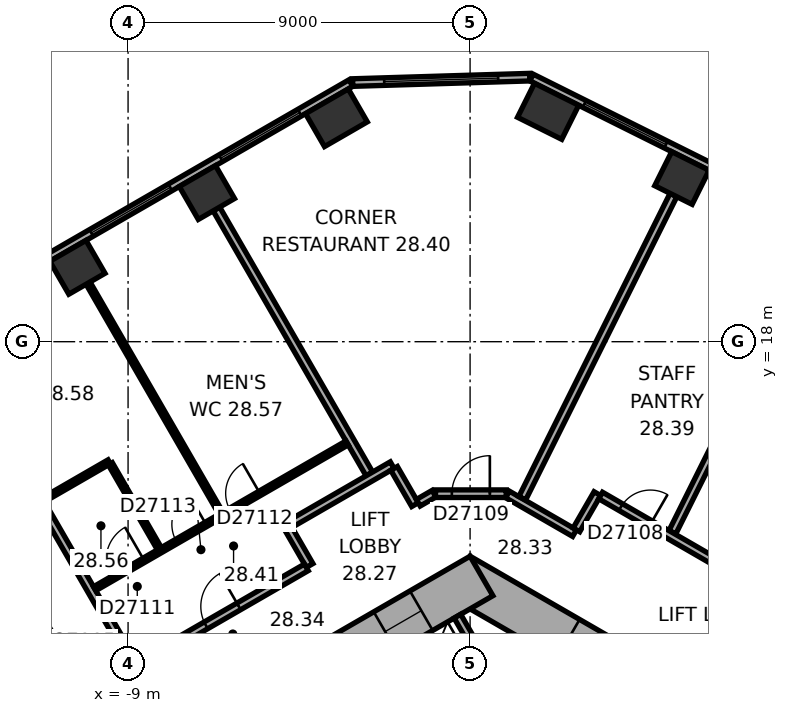
"""IFC4 building model, lengths in metres.
Left out: names, types, materials, properties, quantities, classifications, styles, units other than length and angle.
Written with IfcOpenShell. Run it as: python <this file> out.ifc"""

import sys

from ifc_helpers import new_model, si_unit, direction, frame, frame_2d, origin, origin_2d, place, context, subcontext, project, spatial, rectangle, extrude, element, fill, save


model = new_model("IFC4")
c1 = context("Model", 3, precision=1e-05, world=origin(), true_north=direction((0.0, 1.0)))
c2 = subcontext(c1, "Body", "Model", "MODEL_VIEW")
j1 = project(units=[si_unit("LENGTHUNIT", "METRE"), si_unit("PLANEANGLEUNIT", "RADIAN")], contexts=[c1])
p1 = place(None, origin())
s1 = spatial("IfcSite", under=j1, at=p1, CompositionType="ELEMENT")
p2 = place(p1, origin())
s2 = spatial("IfcBuilding", under=s1, at=p2, CompositionType="ELEMENT")
p3 = place(p2, frame((0.0, 0.0, 116.6)))
s3 = spatial("IfcBuildingStorey", under=s2, at=p3, CompositionType="ELEMENT", Elevation=116.6)
p4 = place(p3, frame((5.574, 22.306, 0.0), z_axis=(0.0, 0.0, 1.0), x_axis=(-0.894934361602, 0.44619781311, 0.0)))
e1 = element("IfcColumn", 1, at=p4, inside=s3, PredefinedType="COLUMN", context=c2, shape_type="SweptSolid", body=[
    extrude(rectangle(XDim=1.1, YDim=1.0, at=origin_2d()), origin(), (0.0, 0.0, 1.0), 3.3),
])
for number, where, z_axis, x_axis in (
    (2, (2.053, 24.062, 0.0), (0.0, 0.0, 1.0), (-0.895, 0.446, 0.0)),
    (3, (-3.518, 23.892, 0.0), (0.0, 0.0, 1.0), (-0.866, -0.5, 0.0)),
):
    element("IfcColumn", number, at=place(p3, frame(where, z_axis=z_axis, x_axis=x_axis)), inside=s3, PredefinedType="COLUMN", context=c2, shape_type="SweptSolid", body=[
        extrude(rectangle(XDim=1.3, YDim=1.0, at=origin_2d()), origin(), (0.0, 0.0, 1.0), 3.3),
    ])
for number, where, z_axis, x_axis in (
    (4, (-6.926, 21.925, 0.0), (0.0, 0.0, 1.0), (-0.866, -0.5, 0.0)),
    (5, (-10.333, 19.957, 0.0), (0.0, 0.0, 1.0), (-0.866, -0.5, 0.0)),
):
    element("IfcColumn", number, at=place(p3, frame(where, z_axis=z_axis, x_axis=x_axis)), inside=s3, PredefinedType="COLUMN", context=c2, shape_type="SweptSolid", body=[
        extrude(rectangle(XDim=1.1, YDim=1.0, at=origin_2d()), origin(), (0.0, 0.0, 1.0), 3.3),
    ])
p5 = place(p3, frame((10.4, 5.658, 0.0), z_axis=(0.0, 0.0, 1.0), x_axis=(-0.866021384402, 0.500006961711, 0.0)))
e6 = element("IfcWall", 6, at=p5, inside=s3, PredefinedType="SHEAR", context=c2, shape_type="SweptSolid", body=[
    extrude(rectangle(XDim=12.355, YDim=1.2, at=frame_2d((6.178, 0.0))), origin(), (0.0, 0.0, 1.0), 3.3),
])
p6 = place(p5, frame((2.728, 0.0, 0.0)))
e7 = element("IfcOpeningElement", 7, at=p6, cuts=e6, PredefinedType="OPENING", context=c2, shape_type="SweptSolid", body=[
    extrude(rectangle(XDim=1.1, YDim=2.1, at=frame_2d((0.55, 1.05))), frame((0.0, 0.61, 0.0), z_axis=(0.0, -1.0, 0.0), x_axis=(1.0, 0.0, 0.0)), (0.0, 0.0, 1.0), 1.22),
])
p7 = place(p5, frame((5.328, 0.0, 0.0)))
e8 = element("IfcOpeningElement", 8, at=p7, cuts=e6, PredefinedType="OPENING", context=c2, shape_type="SweptSolid", body=[
    extrude(rectangle(XDim=1.1, YDim=2.1, at=frame_2d((0.55, 1.05))), frame((0.0, 0.61, 0.0), z_axis=(0.0, -1.0, 0.0), x_axis=(1.0, 0.0, 0.0)), (0.0, 0.0, 1.0), 1.22),
])
p8 = place(p5, frame((7.928, 0.0, 0.0)))
e9 = element("IfcOpeningElement", 9, at=p8, cuts=e6, PredefinedType="OPENING", context=c2, shape_type="SweptSolid", body=[
    extrude(rectangle(XDim=1.1, YDim=2.1, at=frame_2d((0.55, 1.05))), frame((0.0, 0.61, 0.0), z_axis=(0.0, -1.0, 0.0), x_axis=(1.0, 0.0, 0.0)), (0.0, 0.0, 1.0), 1.22),
])
p9 = place(p3, frame((0.3, 11.836, 0.0), z_axis=(0.0, 0.0, 1.0), x_axis=(-0.866021384402, -0.500006961711, 0.0)))
e10 = element("IfcWall", 10, at=p9, inside=s3, PredefinedType="SHEAR", context=c2, shape_type="SweptSolid", body=[
    extrude(rectangle(XDim=12.355, YDim=1.2, at=frame_2d((6.178, 0.0))), origin(), (0.0, 0.0, 1.0), 3.3),
])
p10 = place(p9, frame((6.378, 0.0, 0.0)))
e11 = element("IfcOpeningElement", 11, at=p10, cuts=e10, PredefinedType="OPENING", context=c2, shape_type="SweptSolid", body=[
    extrude(rectangle(XDim=1.5, YDim=2.1, at=frame_2d((0.75, 1.05))), frame((0.0, 0.61, 0.0), z_axis=(0.0, -1.0, 0.0), x_axis=(1.0, 0.0, 0.0)), (0.0, 0.0, 1.0), 1.22),
])
p11 = place(p9, frame((1.828, 0.0, 0.0)))
e12 = element("IfcOpeningElement", 12, at=p11, cuts=e10, PredefinedType="OPENING", context=c2, shape_type="SweptSolid", body=[
    extrude(rectangle(XDim=1.1, YDim=2.1, at=frame_2d((0.55, 1.05))), frame((0.0, 0.61, 0.0), z_axis=(0.0, -1.0, 0.0), x_axis=(1.0, 0.0, 0.0)), (0.0, 0.0, 1.0), 1.22),
])
p12 = place(p3, frame((20.63, 15.47, 0.0), z_axis=(0.0, 0.0, 1.0), x_axis=(-0.894934518609, 0.446197498203, 0.0)))
e13 = element("IfcWall", 13, at=p12, inside=s3, PredefinedType="STANDARD", context=c2, shape_type="SweptSolid", body=[
    extrude(rectangle(XDim=21.246, YDim=0.2, at=frame_2d((10.623, 0.0))), origin(), (0.0, 0.0, 1.0), 3.3),
])
p13 = place(p12, frame((1.553, 0.0, 0.8)))
e14 = element("IfcOpeningElement", 14, at=p13, cuts=e13, PredefinedType="OPENING", context=c2, shape_type="SweptSolid", body=[
    extrude(rectangle(XDim=2.4, YDim=1.7, at=frame_2d((1.2, 0.85))), frame((0.0, 0.11, 0.0), z_axis=(0.0, -1.0, 0.0), x_axis=(1.0, 0.0, 0.0)), (0.0, 0.0, 1.0), 0.22),
])
p14 = place(p12, frame((5.488, 0.0, 0.8)))
e15 = element("IfcOpeningElement", 15, at=p14, cuts=e13, PredefinedType="OPENING", context=c2, shape_type="SweptSolid", body=[
    extrude(rectangle(XDim=2.4, YDim=1.7, at=frame_2d((1.2, 0.85))), frame((0.0, 0.11, 0.0), z_axis=(0.0, -1.0, 0.0), x_axis=(1.0, 0.0, 0.0)), (0.0, 0.0, 1.0), 0.22),
])
p15 = place(p12, frame((9.422, 0.0, 0.8)))
e16 = element("IfcOpeningElement", 16, at=p15, cuts=e13, PredefinedType="OPENING", context=c2, shape_type="SweptSolid", body=[
    extrude(rectangle(XDim=2.4, YDim=1.7, at=frame_2d((1.2, 0.85))), frame((0.0, 0.11, 0.0), z_axis=(0.0, -1.0, 0.0), x_axis=(1.0, 0.0, 0.0)), (0.0, 0.0, 1.0), 0.22),
])
p16 = place(p12, frame((13.357, 0.0, 0.8)))
e17 = element("IfcOpeningElement", 17, at=p16, cuts=e13, PredefinedType="OPENING", context=c2, shape_type="SweptSolid", body=[
    extrude(rectangle(XDim=2.4, YDim=1.7, at=frame_2d((1.2, 0.85))), frame((0.0, 0.11, 0.0), z_axis=(0.0, -1.0, 0.0), x_axis=(1.0, 0.0, 0.0)), (0.0, 0.0, 1.0), 0.22),
])
p17 = place(p12, frame((17.292, 0.0, 0.8)))
e18 = element("IfcOpeningElement", 18, at=p17, cuts=e13, PredefinedType="OPENING", context=c2, shape_type="SweptSolid", body=[
    extrude(rectangle(XDim=2.4, YDim=1.7, at=frame_2d((1.2, 0.85))), frame((0.0, 0.11, 0.0), z_axis=(0.0, -1.0, 0.0), x_axis=(1.0, 0.0, 0.0)), (0.0, 0.0, 1.0), 0.22),
])
p18 = place(p3, frame((1.568, 24.961, 0.0), z_axis=(0.0, 0.0, 1.0), x_axis=(-0.999533359013, -0.030546099927, 0.0)))
e19 = element("IfcWall", 19, at=p18, inside=s3, PredefinedType="STANDARD", context=c2, shape_type="SweptSolid", body=[
    extrude(rectangle(XDim=4.66, YDim=0.2, at=frame_2d((2.33, 0.0))), origin(), (0.0, 0.0, 1.0), 3.3),
])
p19 = place(p18, frame((0.83, 0.0, 0.8)))
e20 = element("IfcOpeningElement", 20, at=p19, cuts=e19, PredefinedType="OPENING", context=c2, shape_type="SweptSolid", body=[
    extrude(rectangle(XDim=3.0, YDim=1.7, at=frame_2d((1.5, 0.85))), frame((0.0, 0.11, 0.0), z_axis=(0.0, -1.0, 0.0), x_axis=(1.0, 0.0, 0.0)), (0.0, 0.0, 1.0), 0.22),
])
p20 = place(p3, frame((-3.136, 24.805, 0.0), z_axis=(0.0, 0.0, 1.0), x_axis=(-0.866028291626, -0.499994998079, 0.0)))
e21 = element("IfcWall", 21, at=p20, inside=s3, PredefinedType="STANDARD", context=c2, shape_type="SweptSolid", body=[
    extrude(rectangle(XDim=21.246, YDim=0.2, at=frame_2d((10.623, 0.0))), origin(), (0.0, 0.0, 1.0), 3.3),
])
p21 = place(p20, frame((1.555, 0.0, 0.8)))
e22 = element("IfcOpeningElement", 22, at=p21, cuts=e21, PredefinedType="OPENING", context=c2, shape_type="SweptSolid", body=[
    extrude(rectangle(XDim=2.4, YDim=1.7, at=frame_2d((1.2, 0.85))), frame((0.0, 0.11, 0.0), z_axis=(0.0, -1.0, 0.0), x_axis=(1.0, 0.0, 0.0)), (0.0, 0.0, 1.0), 0.22),
])
p22 = place(p20, frame((5.489, 0.0, 0.8)))
e23 = element("IfcOpeningElement", 23, at=p22, cuts=e21, PredefinedType="OPENING", context=c2, shape_type="SweptSolid", body=[
    extrude(rectangle(XDim=2.4, YDim=1.7, at=frame_2d((1.2, 0.85))), frame((0.0, 0.11, 0.0), z_axis=(0.0, -1.0, 0.0), x_axis=(1.0, 0.0, 0.0)), (0.0, 0.0, 1.0), 0.22),
])
p23 = place(p20, frame((9.424, 0.0, 0.8)))
e24 = element("IfcOpeningElement", 24, at=p23, cuts=e21, PredefinedType="OPENING", context=c2, shape_type="SweptSolid", body=[
    extrude(rectangle(XDim=2.4, YDim=1.7, at=frame_2d((1.2, 0.85))), frame((0.0, 0.11, 0.0), z_axis=(0.0, -1.0, 0.0), x_axis=(1.0, 0.0, 0.0)), (0.0, 0.0, 1.0), 0.22),
])
p24 = place(p20, frame((13.358, 0.0, 0.8)))
e25 = element("IfcOpeningElement", 25, at=p24, cuts=e21, PredefinedType="OPENING", context=c2, shape_type="SweptSolid", body=[
    extrude(rectangle(XDim=2.4, YDim=1.7, at=frame_2d((1.2, 0.85))), frame((0.0, 0.11, 0.0), z_axis=(0.0, -1.0, 0.0), x_axis=(1.0, 0.0, 0.0)), (0.0, 0.0, 1.0), 0.22),
])
p25 = place(p20, frame((17.293, 0.0, 0.8)))
e26 = element("IfcOpeningElement", 26, at=p25, cuts=e21, PredefinedType="OPENING", context=c2, shape_type="SweptSolid", body=[
    extrude(rectangle(XDim=2.4, YDim=1.7, at=frame_2d((1.2, 0.85))), frame((0.0, 0.11, 0.0), z_axis=(0.0, -1.0, 0.0), x_axis=(1.0, 0.0, 0.0)), (0.0, 0.0, 1.0), 0.22),
])
p26 = place(p3, frame((0.767, 8.872, 0.0), z_axis=(0.0, 0.0, 1.0), x_axis=(-0.499994660107, 0.866028486751, 0.0)))
e27 = element("IfcWall", 27, at=p26, inside=s3, PredefinedType="PARTITIONING", context=c2, shape_type="SweptSolid", body=[
    extrude(rectangle(XDim=2.2, YDim=0.2, at=frame_2d((1.1, 0.0))), origin(), (0.0, 0.0, 1.0), 2.95),
])
p27 = place(p3, frame((-11.385, 10.909, 0.0), z_axis=(0.0, 0.0, 1.0), x_axis=(0.500077547548, -0.865980627057, 0.0)))
e28 = element("IfcWall", 28, at=p27, inside=s3, PredefinedType="PARTITIONING", context=c2, shape_type="SweptSolid", body=[
    extrude(rectangle(XDim=2.44, YDim=0.12, at=frame_2d((1.22, 0.0))), origin(), (0.0, 0.0, 1.0), 2.95),
])
p28 = place(p27, frame((0.77, 0.0, 0.0)))
e29 = element("IfcOpeningElement", 29, at=p28, cuts=e28, PredefinedType="OPENING", context=c2, shape_type="SweptSolid", body=[
    extrude(rectangle(XDim=0.9, YDim=2.1, at=frame_2d((0.45, 1.05))), frame((0.0, 0.07, 0.0), z_axis=(0.0, -1.0, 0.0), x_axis=(1.0, 0.0, 0.0)), (0.0, 0.0, 1.0), 0.14),
])
p29 = place(p3, frame((-10.053, 19.542, 0.0), z_axis=(0.0, 0.0, 1.0), x_axis=(0.49998952364, -0.866031452229, 0.0)))
e30 = element("IfcWall", 30, at=p29, inside=s3, PredefinedType="PARTITIONING", context=c2, shape_type="SweptSolid", body=[
    extrude(rectangle(XDim=6.99, YDim=0.12, at=frame_2d((3.495, 0.0))), origin(), (0.0, 0.0, 1.0), 2.15),
])
p30 = place(p3, frame((-9.497, 14.84, 0.0), z_axis=(0.0, 0.0, 1.0), x_axis=(-0.866041268327, -0.499972520799, 0.0)))
e31 = element("IfcWall", 31, at=p30, inside=s3, PredefinedType="PARTITIONING", context=c2, shape_type="SweptSolid", body=[
    extrude(rectangle(XDim=2.0, YDim=0.12, at=frame_2d((1.0, 0.0))), origin(), (0.0, 0.0, 1.0), 2.95),
])
p31 = place(p3, frame((-8.177, 12.553, 0.0), z_axis=(0.0, 0.0, 1.0), x_axis=(-0.500006411147, 0.866021702275, 0.0)))
e32 = element("IfcWall", 32, at=p31, inside=s3, PredefinedType="PARTITIONING", context=c2, shape_type="SweptSolid", body=[
    extrude(rectangle(XDim=2.58, YDim=0.12, at=frame_2d((1.29, 0.0))), origin(), (0.0, 0.0, 1.0), 2.95),
])
p32 = place(p3, frame((-7.865, 7.814, 0.0), z_axis=(0.0, 0.0, 1.0), x_axis=(-0.500004234368, 0.866022959057, 0.0)))
e33 = element("IfcWall", 33, at=p32, inside=s3, PredefinedType="PARTITIONING", context=c2, shape_type="SweptSolid", body=[
    extrude(rectangle(XDim=11.25, YDim=0.2, at=frame_2d((5.625, 0.0))), origin(), (0.0, 0.0, 1.0), 2.95),
])
p33 = place(p32, frame((0.5, 0.0, 0.0)))
e34 = element("IfcOpeningElement", 34, at=p33, cuts=e33, PredefinedType="OPENING", context=c2, shape_type="SweptSolid", body=[
    extrude(rectangle(XDim=0.9, YDim=2.1, at=frame_2d((0.45, 1.05))), frame((0.0, 0.11, 0.0), z_axis=(0.0, -1.0, 0.0), x_axis=(1.0, 0.0, 0.0)), (0.0, 0.0, 1.0), 0.22),
])
p34 = place(p3, frame((-6.676, 21.492, 0.0), z_axis=(0.0, 0.0, 1.0), x_axis=(0.500011263043, -0.866018900966, 0.0)))
e35 = element("IfcWall", 35, at=p34, inside=s3, PredefinedType="PARTITIONING", context=c2, shape_type="SweptSolid", body=[
    extrude(rectangle(XDim=8.049, YDim=0.2, at=frame_2d((4.024, 0.0))), origin(), (0.0, 0.0, 1.0), 2.95),
])
p35 = place(p3, frame((-4.823, 13.152, 0.0), z_axis=(0.0, 0.0, 1.0), x_axis=(0.499986357472, -0.866033280158, 0.0)))
e36 = element("IfcWall", 36, at=p35, inside=s3, PredefinedType="PARTITIONING", context=c2, shape_type="SweptSolid", body=[
    extrude(rectangle(XDim=1.201, YDim=0.2, at=frame_2d((0.601, 0.0))), origin(), (0.0, 0.0, 1.0), 2.95),
])
p36 = place(p3, frame((-4.309, 12.061, 0.0), z_axis=(0.0, 0.0, 1.0), x_axis=(-0.866020679205, -0.500008183122, 0.0)))
e37 = element("IfcWall", 37, at=p36, inside=s3, PredefinedType="PARTITIONING", context=c2, shape_type="SweptSolid", body=[
    extrude(rectangle(XDim=5.104, YDim=0.2, at=frame_2d((2.552, 0.0))), origin(), (0.0, 0.0, 1.0), 2.95),
])
p37 = place(p36, frame((2.052, 0.0, 0.0)))
e38 = element("IfcOpeningElement", 38, at=p37, cuts=e37, PredefinedType="OPENING", context=c2, shape_type="SweptSolid", body=[
    extrude(rectangle(XDim=1.0, YDim=2.1, at=frame_2d((0.5, 1.05))), frame((0.0, 0.11, 0.0), z_axis=(0.0, -1.0, 0.0), x_axis=(1.0, 0.0, 0.0)), (0.0, 0.0, 1.0), 0.22),
])
p38 = place(p3, frame((-3.237, 15.336, 0.0), z_axis=(0.0, 0.0, 1.0), x_axis=(-0.866022840924, -0.500004438978, 0.0)))
e39 = element("IfcWall", 39, at=p38, inside=s3, PredefinedType="PARTITIONING", context=c2, shape_type="SweptSolid", body=[
    extrude(rectangle(XDim=7.669, YDim=0.12, at=frame_2d((3.835, 0.0))), origin(), (0.0, 0.0, 1.0), 2.95),
])
p39 = place(p38, frame((6.169, 0.0, 0.0)))
e40 = element("IfcOpeningElement", 40, at=p39, cuts=e39, PredefinedType="OPENING", context=c2, shape_type="SweptSolid", body=[
    extrude(rectangle(XDim=1.0, YDim=2.1, at=frame_2d((0.5, 1.05))), frame((0.0, 0.07, 0.0), z_axis=(0.0, -1.0, 0.0), x_axis=(1.0, 0.0, 0.0)), (0.0, 0.0, 1.0), 0.14),
])
p40 = place(p38, frame((2.65, 0.0, 0.0)))
e41 = element("IfcOpeningElement", 41, at=p40, cuts=e39, PredefinedType="OPENING", context=c2, shape_type="SweptSolid", body=[
    extrude(rectangle(XDim=0.9, YDim=2.1, at=frame_2d((0.45, 1.05))), frame((0.0, 0.07, 0.0), z_axis=(0.0, -1.0, 0.0), x_axis=(1.0, 0.0, 0.0)), (0.0, 0.0, 1.0), 0.14),
])
p41 = place(p38, frame((4.285, 0.0, 0.0)))
e42 = element("IfcOpeningElement", 42, at=p41, cuts=e39, PredefinedType="OPENING", context=c2, shape_type="SweptSolid", body=[
    extrude(rectangle(XDim=0.9, YDim=2.1, at=frame_2d((0.45, 1.05))), frame((0.0, 0.07, 0.0), z_axis=(0.0, -1.0, 0.0), x_axis=(1.0, 0.0, 0.0)), (0.0, 0.0, 1.0), 0.14),
])
p42 = place(p3, frame((-2.05, 14.752, 0.0), z_axis=(0.0, 0.0, 1.0), x_axis=(-0.866030936828, -0.499990416364, 0.0)))
e43 = element("IfcWall", 43, at=p42, inside=s3, PredefinedType="PARTITIONING", context=c2, shape_type="SweptSolid", body=[
    extrude(rectangle(XDim=3.102, YDim=0.2, at=frame_2d((1.551, 0.0))), origin(), (0.0, 0.0, 1.0), 2.95),
])
p43 = place(p3, frame((-1.449, 13.712, 0.0), z_axis=(0.0, 0.0, 1.0), x_axis=(-0.499978356969, 0.866037899034, 0.0)))
e44 = element("IfcWall", 44, at=p43, inside=s3, PredefinedType="PARTITIONING", context=c2, shape_type="SweptSolid", body=[
    extrude(rectangle(XDim=1.101, YDim=0.2, at=frame_2d((0.551, 0.0))), origin(), (0.0, 0.0, 1.0), 2.95),
])
p44 = place(p3, frame((-0.95, 14.001, 0.0), z_axis=(0.0, 0.0, 1.0), x_axis=(-0.86609177584, -0.499885022602, 0.0)))
e45 = element("IfcWall", 45, at=p44, inside=s3, PredefinedType="PARTITIONING", context=c2, shape_type="SweptSolid", body=[
    extrude(rectangle(XDim=0.477, YDim=0.2, at=frame_2d((0.238, 0.0))), origin(), (0.0, 0.0, 1.0), 2.95),
])
p45 = place(p3, frame((0.95, 14.001, 0.0), z_axis=(0.0, 0.0, 1.0), x_axis=(-1.0, 0.0, 0.0)))
e46 = element("IfcWall", 46, at=p45, inside=s3, PredefinedType="PARTITIONING", context=c2, shape_type="SweptSolid", body=[
    extrude(rectangle(XDim=1.86, YDim=0.2, at=frame_2d((0.93, 0.0))), origin(), (0.0, 0.0, 1.0), 2.95),
])
p46 = place(p45, frame((0.43, 0.0, 0.0)))
e47 = element("IfcOpeningElement", 47, at=p46, cuts=e46, PredefinedType="OPENING", context=c2, shape_type="SweptSolid", body=[
    extrude(rectangle(XDim=1.0, YDim=2.1, at=frame_2d((0.5, 1.05))), frame((0.0, 0.11, 0.0), z_axis=(0.0, -1.0, 0.0), x_axis=(1.0, 0.0, 0.0)), (0.0, 0.0, 1.0), 0.22),
])
p47 = place(p3, frame((2.748, 12.962, 0.0), z_axis=(0.0, 0.0, 1.0), x_axis=(-0.866013897511, 0.50001992892, 0.0)))
e48 = element("IfcWall", 48, at=p47, inside=s3, PredefinedType="PARTITIONING", context=c2, shape_type="SweptSolid", body=[
    extrude(rectangle(XDim=2.037, YDim=0.2, at=frame_2d((1.018, 0.0))), origin(), (0.0, 0.0, 1.0), 2.95),
])
p48 = place(p3, frame((3.349, 14.002, 0.0), z_axis=(0.0, 0.0, 1.0), x_axis=(-0.500074377092, -0.865982457891, 0.0)))
e49 = element("IfcWall", 49, at=p48, inside=s3, PredefinedType="PARTITIONING", context=c2, shape_type="SweptSolid", body=[
    extrude(rectangle(XDim=1.101, YDim=0.2, at=frame_2d((0.55, 0.0))), origin(), (0.0, 0.0, 1.0), 2.95),
])
p49 = place(p3, frame((5.351, 21.859, 0.0), z_axis=(0.0, 0.0, 1.0), x_axis=(-0.446205309328, -0.894930624086, 0.0)))
e50 = element("IfcWall", 50, at=p49, inside=s3, PredefinedType="PARTITIONING", context=c2, shape_type="SweptSolid", body=[
    extrude(rectangle(XDim=8.913, YDim=0.2, at=frame_2d((4.457, 0.0))), origin(), (0.0, 0.0, 1.0), 2.15),
])
p50 = place(p3, frame((8.872, 20.104, 0.0), z_axis=(0.0, 0.0, 1.0), x_axis=(-0.446218378653, -0.894924107706, 0.0)))
e51 = element("IfcWall", 51, at=p50, inside=s3, PredefinedType="PARTITIONING", context=c2, shape_type="SweptSolid", body=[
    extrude(rectangle(XDim=7.95, YDim=0.2, at=frame_2d((3.975, 0.0))), origin(), (0.0, 0.0, 1.0), 2.95),
])
p51 = place(p3, frame((10.885, 9.652, 0.0), z_axis=(0.0, 0.0, 1.0), x_axis=(-0.866033868542, 0.499985338323, 0.0)))
e52 = element("IfcWall", 52, at=p51, inside=s3, PredefinedType="PARTITIONING", context=c2, shape_type="SweptSolid", body=[
    extrude(rectangle(XDim=8.602, YDim=0.2, at=frame_2d((4.301, 0.0))), origin(), (0.0, 0.0, 1.0), 2.95),
])
p52 = place(p51, frame((1.464, 0.0, 0.0)))
e53 = element("IfcOpeningElement", 53, at=p52, cuts=e52, PredefinedType="OPENING", context=c2, shape_type="SweptSolid", body=[
    extrude(rectangle(XDim=0.9, YDim=2.1, at=frame_2d((0.45, 1.05))), frame((0.0, 0.11, 0.0), z_axis=(0.0, -1.0, 0.0), x_axis=(1.0, 0.0, 0.0)), (0.0, 0.0, 1.0), 0.22),
])
p53 = place(p51, frame((7.09, 0.0, 0.0)))
e54 = element("IfcOpeningElement", 54, at=p53, cuts=e52, PredefinedType="OPENING", context=c2, shape_type="SweptSolid", body=[
    extrude(rectangle(XDim=0.9, YDim=2.1, at=frame_2d((0.45, 1.05))), frame((0.0, 0.11, 0.0), z_axis=(0.0, -1.0, 0.0), x_axis=(1.0, 0.0, 0.0)), (0.0, 0.0, 1.0), 0.22),
])
p54 = place(p17, origin())
e55 = element("IfcWindow", 55, at=p54, inside=s3, PartitioningType="SINGLE_PANEL", PredefinedType="WINDOW", context=c2, shape_type="SweptSolid", body=[
    extrude(rectangle(XDim=2.4, YDim=1.7, at=frame_2d((1.2, 0.85))), frame((0.0, 0.03, 0.0), z_axis=(0.0, -1.0, 0.0), x_axis=(1.0, 0.0, 0.0)), (0.0, 0.0, 1.0), 0.06),
])
fill(e18, e55)
p55 = place(p19, origin())
e56 = element("IfcWindow", 56, at=p55, inside=s3, PartitioningType="SINGLE_PANEL", PredefinedType="WINDOW", context=c2, shape_type="SweptSolid", body=[
    extrude(rectangle(XDim=3.0, YDim=1.7, at=frame_2d((1.5, 0.85))), frame((0.0, 0.03, 0.0), z_axis=(0.0, -1.0, 0.0), x_axis=(1.0, 0.0, 0.0)), (0.0, 0.0, 1.0), 0.06),
])
fill(e20, e56)
p56 = place(p21, origin())
e57 = element("IfcWindow", 57, at=p56, inside=s3, PartitioningType="SINGLE_PANEL", PredefinedType="WINDOW", context=c2, shape_type="SweptSolid", body=[
    extrude(rectangle(XDim=2.4, YDim=1.7, at=frame_2d((1.2, 0.85))), frame((0.0, 0.03, 0.0), z_axis=(0.0, -1.0, 0.0), x_axis=(1.0, 0.0, 0.0)), (0.0, 0.0, 1.0), 0.06),
])
fill(e22, e57)
p57 = place(p22, origin())
e58 = element("IfcWindow", 58, at=p57, inside=s3, PartitioningType="SINGLE_PANEL", PredefinedType="WINDOW", context=c2, shape_type="SweptSolid", body=[
    extrude(rectangle(XDim=2.4, YDim=1.7, at=frame_2d((1.2, 0.85))), frame((0.0, 0.03, 0.0), z_axis=(0.0, -1.0, 0.0), x_axis=(1.0, 0.0, 0.0)), (0.0, 0.0, 1.0), 0.06),
])
fill(e23, e58)
p58 = place(p11, origin())
e59 = element("IfcDoor", 59, at=p58, inside=s3, OperationType="DOUBLE_DOOR_SLIDING", PredefinedType="DOOR", context=c2, shape_type="SweptSolid", body=[
    extrude(rectangle(XDim=1.1, YDim=2.1, at=frame_2d((0.55, 1.05))), frame((0.0, 0.025, 0.0), z_axis=(0.0, -1.0, 0.0), x_axis=(1.0, 0.0, 0.0)), (0.0, 0.0, 1.0), 0.05),
])
fill(e12, e59)
p59 = place(p53, origin())
e60 = element("IfcDoor", 60, at=p59, inside=s3, OperationType="SINGLE_SWING_LEFT", PredefinedType="DOOR", context=c2, shape_type="SweptSolid", body=[
    extrude(rectangle(XDim=0.9, YDim=2.1, at=frame_2d((0.45, 1.05))), frame((0.0, 0.025, 0.0), z_axis=(0.0, -1.0, 0.0), x_axis=(1.0, 0.0, 0.0)), (0.0, 0.0, 1.0), 0.05),
])
fill(e54, e60)
p60 = place(p46, origin())
e61 = element("IfcDoor", 61, at=p60, inside=s3, OperationType="SINGLE_SWING_LEFT", PredefinedType="DOOR", context=c2, shape_type="SweptSolid", body=[
    extrude(rectangle(XDim=1.0, YDim=2.1, at=frame_2d((0.5, 1.05))), frame((0.0, 0.025, 0.0), z_axis=(0.0, -1.0, 0.0), x_axis=(1.0, 0.0, 0.0)), (0.0, 0.0, 1.0), 0.05),
])
fill(e47, e61)
p61 = place(p37, origin())
e62 = element("IfcDoor", 62, at=p61, inside=s3, OperationType="SINGLE_SWING_LEFT", PredefinedType="DOOR", context=c2, shape_type="SweptSolid", body=[
    extrude(rectangle(XDim=1.0, YDim=2.1, at=frame_2d((0.5, 1.05))), frame((0.0, 0.025, 0.0), z_axis=(0.0, -1.0, 0.0), x_axis=(1.0, 0.0, 0.0)), (0.0, 0.0, 1.0), 0.05),
])
fill(e38, e62)
p62 = place(p39, origin())
e63 = element("IfcDoor", 63, at=p62, inside=s3, OperationType="SINGLE_SWING_LEFT", PredefinedType="DOOR", context=c2, shape_type="SweptSolid", body=[
    extrude(rectangle(XDim=1.0, YDim=2.1, at=frame_2d((0.5, 1.05))), frame((0.0, 0.025, 0.0), z_axis=(0.0, -1.0, 0.0), x_axis=(1.0, 0.0, 0.0)), (0.0, 0.0, 1.0), 0.05),
])
fill(e40, e63)
p63 = place(p40, origin())
e64 = element("IfcDoor", 64, at=p63, inside=s3, OperationType="SINGLE_SWING_LEFT", PredefinedType="DOOR", context=c2, shape_type="SweptSolid", body=[
    extrude(rectangle(XDim=0.9, YDim=2.1, at=frame_2d((0.45, 1.05))), frame((0.0, 0.025, 0.0), z_axis=(0.0, -1.0, 0.0), x_axis=(1.0, 0.0, 0.0)), (0.0, 0.0, 1.0), 0.05),
])
fill(e41, e64)
p64 = place(p41, origin())
e65 = element("IfcDoor", 65, at=p64, inside=s3, OperationType="SINGLE_SWING_LEFT", PredefinedType="DOOR", context=c2, shape_type="SweptSolid", body=[
    extrude(rectangle(XDim=0.9, YDim=2.1, at=frame_2d((0.45, 1.05))), frame((0.0, 0.025, 0.0), z_axis=(0.0, -1.0, 0.0), x_axis=(1.0, 0.0, 0.0)), (0.0, 0.0, 1.0), 0.05),
])
fill(e42, e65)
save(model, sys.argv[1])
